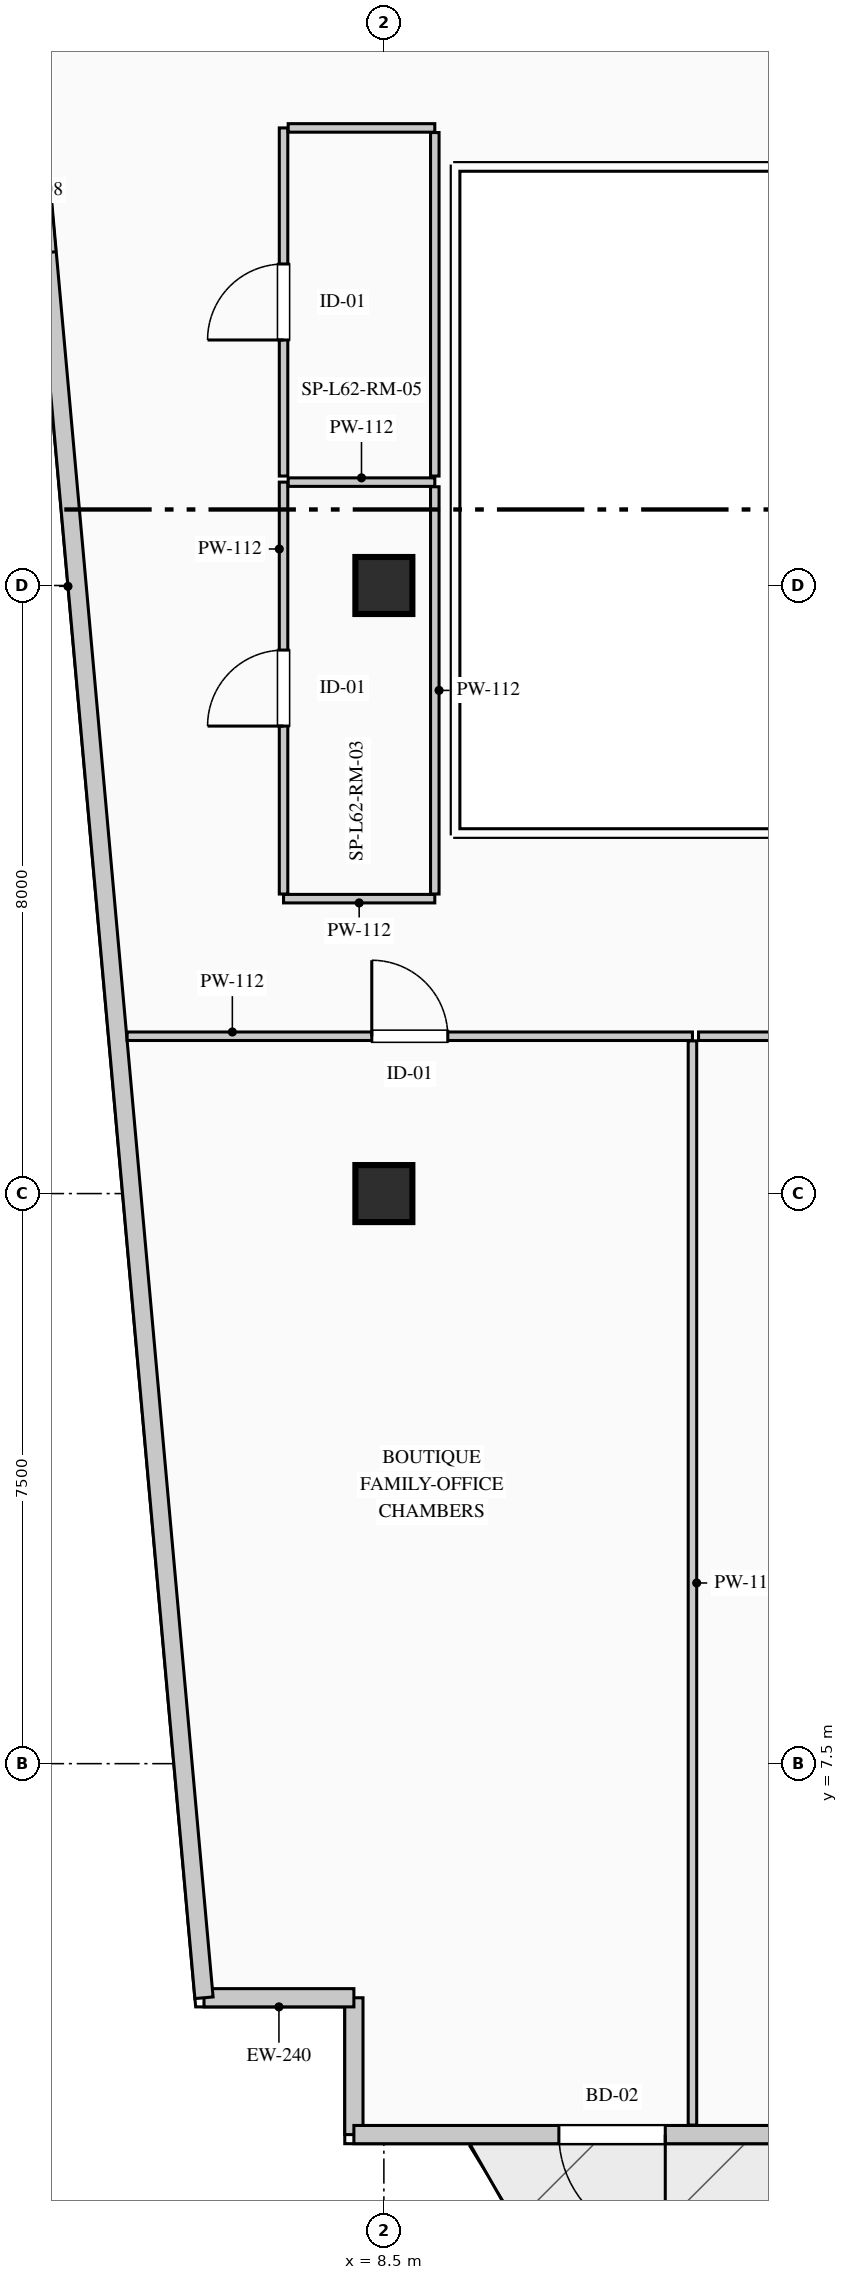
"""IFC4 building model, lengths in metres.
Left out: names, types, materials, properties, quantities, classifications, styles, units other than length and angle.
Written with IfcOpenShell. Run it as: python <this file> out.ifc"""

import sys

from ifc_helpers import new_model, si_unit, direction, frame, frame_2d, origin, origin_2d, place, context, subcontext, project, spatial, rectangle, extrude, element, fill, save


model = new_model("IFC4")
c1 = context("Model", 3, precision=1e-05, world=origin(), true_north=direction((0.0, 1.0)))
c2 = subcontext(c1, "Body", "Model", "MODEL_VIEW")
j1 = project(units=[si_unit("LENGTHUNIT", "METRE"), si_unit("PLANEANGLEUNIT", "RADIAN")], contexts=[c1])
p1 = place(None, origin())
s1 = spatial("IfcSite", under=j1, at=p1, CompositionType="ELEMENT")
p2 = place(p1, origin())
s2 = spatial("IfcBuilding", under=s1, at=p2, CompositionType="ELEMENT")
p3 = place(p2, frame((0.0, 0.0, 260.65)))
s3 = spatial("IfcBuildingStorey", under=s2, at=p3, CompositionType="ELEMENT", Elevation=260.65)
for number, where, z_axis, x_axis in (
    (1, (8.5, 15.0, 0.0), (0.0, 0.0, 1.0), (1.0, 0.0, 0.0)),
    (2, (8.5, 23.0, 0.0), (0.0, 0.0, 1.0), (1.0, 0.0, 0.0)),
):
    element("IfcColumn", number, at=place(p3, frame(where, z_axis=z_axis, x_axis=x_axis)), inside=s3, PredefinedType="COLUMN", context=c2, shape_type="SweptSolid", body=[
        extrude(rectangle(XDim=0.75, YDim=0.75, at=origin_2d()), origin(), (0.0, 0.0, 1.0), 3.95),
    ])
p4 = place(p3, frame((8.105, 2.62, 0.0), z_axis=(0.0, 0.0, 1.0), x_axis=(0.0, 1.0, 0.0)))
e3 = element("IfcWall", 3, at=p4, inside=s3, PredefinedType="STANDARD", context=c2, shape_type="SweptSolid", body=[
    extrude(rectangle(XDim=1.8, YDim=0.24, at=frame_2d((0.9, 0.0))), origin(), (0.0, 0.0, 1.0), 3.7),
])
p5 = place(p3, frame((8.105, 4.42, 0.0), z_axis=(0.0, 0.0, 1.0), x_axis=(-1.0, 0.0, 0.0)))
e4 = element("IfcWall", 4, at=p5, inside=s3, PredefinedType="STANDARD", context=c2, shape_type="SweptSolid", body=[
    extrude(rectangle(XDim=1.972, YDim=0.24, at=frame_2d((0.986, 0.0))), origin(), (0.0, 0.0, 1.0), 3.7),
])
p6 = place(p3, frame((6.133, 4.42, 0.0), z_axis=(0.0, 0.0, 1.0), x_axis=(-0.089522678378, 0.995984784048, 0.0)))
e5 = element("IfcWall", 5, at=p6, inside=s3, PredefinedType="STANDARD", context=c2, shape_type="SweptSolid", body=[
    extrude(rectangle(XDim=37.31, YDim=0.24, at=frame_2d((18.655, 0.0))), origin(), (0.0, 0.0, 1.0), 3.7),
])
p7 = place(p6, frame((23.053, 0.0, 0.9)))
e6 = element("IfcOpeningElement", 6, at=p7, cuts=e5, PredefinedType="OPENING", context=c2, shape_type="SweptSolid", body=[
    extrude(rectangle(XDim=1.65, YDim=1.95, at=frame_2d((0.825, 0.975))), frame((0.0, 0.13, 0.0), z_axis=(0.0, -1.0, 0.0), x_axis=(1.0, 0.0, 0.0)), (0.0, 0.0, 1.0), 0.26),
])
p8 = place(p3, frame((16.513, 2.62, 0.0), z_axis=(0.0, 0.0, 1.0), x_axis=(-1.0, 0.0, 0.0)))
e7 = element("IfcWall", 7, at=p8, inside=s3, PredefinedType="STANDARD", context=c2, shape_type="SweptSolid", body=[
    extrude(rectangle(XDim=8.408, YDim=0.24, at=frame_2d((4.204, 0.0))), origin(), (0.0, 0.0, 1.0), 3.7),
])
p9 = place(p8, frame((4.311, 0.0, 0.0)))
e8 = element("IfcOpeningElement", 8, at=p9, cuts=e7, PredefinedType="OPENING", context=c2, shape_type="SweptSolid", body=[
    extrude(rectangle(XDim=1.4, YDim=2.2, at=frame_2d((0.7, 1.1))), frame((0.0, 0.13, 0.0), z_axis=(0.0, -1.0, 0.0), x_axis=(1.0, 0.0, 0.0)), (0.0, 0.0, 1.0), 0.26),
])
p10 = place(p3, frame((5.122, 17.07, 0.0), z_axis=(0.0, 0.0, 1.0), x_axis=(1.0, 0.0, 0.0)))
e9 = element("IfcWall", 9, at=p10, inside=s3, PredefinedType="PARTITIONING", context=c2, shape_type="SweptSolid", body=[
    extrude(rectangle(XDim=7.438, YDim=0.112, at=frame_2d((3.719, 0.0))), origin(), (0.0, 0.0, 1.0), 3.7),
])
p11 = place(p10, frame((3.219, 0.0, 0.0)))
e10 = element("IfcOpeningElement", 10, at=p11, cuts=e9, PredefinedType="OPENING", context=c2, shape_type="SweptSolid", body=[
    extrude(rectangle(XDim=1.0, YDim=2.15, at=frame_2d((0.5, 1.075))), frame((0.0, 0.066, 0.0), z_axis=(0.0, -1.0, 0.0), x_axis=(1.0, 0.0, 0.0)), (0.0, 0.0, 1.0), 0.132),
])
p12 = place(p3, frame((12.56, 17.009, 0.0), z_axis=(0.0, 0.0, 1.0), x_axis=(0.0, -1.0, 0.0)))
e11 = element("IfcWall", 11, at=p12, inside=s3, PredefinedType="PARTITIONING", context=c2, shape_type="SweptSolid", body=[
    extrude(rectangle(XDim=14.264, YDim=0.112, at=frame_2d((7.132, 0.0))), origin(), (0.0, 0.0, 1.0), 3.7),
])
p13 = place(p3, frame((12.64, 17.07, 0.0), z_axis=(0.0, 0.0, 1.0), x_axis=(1.0, 0.0, 0.0)))
e12 = element("IfcWall", 12, at=p13, inside=s3, PredefinedType="PARTITIONING", context=c2, shape_type="SweptSolid", body=[
    extrude(rectangle(XDim=7.587, YDim=0.112, at=frame_2d((3.793, 0.0))), origin(), (0.0, 0.0, 1.0), 3.7),
])
p14 = place(p13, frame((3.293, 0.0, 0.0)))
e13 = element("IfcOpeningElement", 13, at=p14, cuts=e12, PredefinedType="OPENING", context=c2, shape_type="SweptSolid", body=[
    extrude(rectangle(XDim=1.0, YDim=2.15, at=frame_2d((0.5, 1.075))), frame((0.0, 0.066, 0.0), z_axis=(0.0, -1.0, 0.0), x_axis=(1.0, 0.0, 0.0)), (0.0, 0.0, 1.0), 0.132),
])
p15 = place(p3, frame((9.17, 18.88, 0.0), z_axis=(0.0, 0.0, 1.0), x_axis=(-1.0, 0.0, 0.0)))
e14 = element("IfcWall", 14, at=p15, inside=s3, PredefinedType="PARTITIONING", context=c2, shape_type="SweptSolid", body=[
    extrude(rectangle(XDim=1.99, YDim=0.112, at=frame_2d((0.995, 0.0))), origin(), (0.0, 0.0, 1.0), 3.7),
])
p16 = place(p3, frame((7.18, 18.941, 0.0), z_axis=(0.0, 0.0, 1.0), x_axis=(0.0, 1.0, 0.0)))
e15 = element("IfcWall", 15, at=p16, inside=s3, PredefinedType="PARTITIONING", context=c2, shape_type="SweptSolid", body=[
    extrude(rectangle(XDim=5.419, YDim=0.112, at=frame_2d((2.709, 0.0))), origin(), (0.0, 0.0, 1.0), 3.7),
])
p17 = place(p16, frame((2.209, 0.0, 0.0)))
e16 = element("IfcOpeningElement", 16, at=p17, cuts=e15, PredefinedType="OPENING", context=c2, shape_type="SweptSolid", body=[
    extrude(rectangle(XDim=1.0, YDim=2.15, at=frame_2d((0.5, 1.075))), frame((0.0, 0.066, 0.0), z_axis=(0.0, -1.0, 0.0), x_axis=(1.0, 0.0, 0.0)), (0.0, 0.0, 1.0), 0.132),
])
p18 = place(p3, frame((7.241, 24.36, 0.0), z_axis=(0.0, 0.0, 1.0), x_axis=(1.0, 0.0, 0.0)))
e17 = element("IfcWall", 17, at=p18, inside=s3, PredefinedType="PARTITIONING", context=c2, shape_type="SweptSolid", body=[
    extrude(rectangle(XDim=1.929, YDim=0.112, at=frame_2d((0.964, 0.0))), origin(), (0.0, 0.0, 1.0), 3.7),
])
p19 = place(p3, frame((9.17, 24.299, 0.0), z_axis=(0.0, 0.0, 1.0), x_axis=(0.0, -1.0, 0.0)))
e18 = element("IfcWall", 18, at=p19, inside=s3, PredefinedType="PARTITIONING", context=c2, shape_type="SweptSolid", body=[
    extrude(rectangle(XDim=5.358, YDim=0.112, at=frame_2d((2.679, 0.0))), origin(), (0.0, 0.0, 1.0), 3.385),
])
p20 = place(p3, frame((7.18, 24.44, 0.0), z_axis=(0.0, 0.0, 1.0), x_axis=(0.0, 1.0, 0.0)))
e19 = element("IfcWall", 19, at=p20, inside=s3, PredefinedType="PARTITIONING", context=c2, shape_type="SweptSolid", body=[
    extrude(rectangle(XDim=4.58, YDim=0.112, at=frame_2d((2.29, 0.0))), origin(), (0.0, 0.0, 1.0), 3.7),
])
p21 = place(p20, frame((1.79, 0.0, 0.0)))
e20 = element("IfcOpeningElement", 20, at=p21, cuts=e19, PredefinedType="OPENING", context=c2, shape_type="SweptSolid", body=[
    extrude(rectangle(XDim=1.0, YDim=2.15, at=frame_2d((0.5, 1.075))), frame((0.0, 0.066, 0.0), z_axis=(0.0, -1.0, 0.0), x_axis=(1.0, 0.0, 0.0)), (0.0, 0.0, 1.0), 0.132),
])
p22 = place(p3, frame((7.241, 29.02, 0.0), z_axis=(0.0, 0.0, 1.0), x_axis=(1.0, 0.0, 0.0)))
e21 = element("IfcWall", 21, at=p22, inside=s3, PredefinedType="PARTITIONING", context=c2, shape_type="SweptSolid", body=[
    extrude(rectangle(XDim=1.929, YDim=0.112, at=frame_2d((0.964, 0.0))), origin(), (0.0, 0.0, 1.0), 3.7),
])
p23 = place(p3, frame((9.17, 28.959, 0.0), z_axis=(0.0, 0.0, 1.0), x_axis=(0.0, -1.0, 0.0)))
e22 = element("IfcWall", 22, at=p23, inside=s3, PredefinedType="PARTITIONING", context=c2, shape_type="SweptSolid", body=[
    extrude(rectangle(XDim=4.519, YDim=0.112, at=frame_2d((2.26, 0.0))), origin(), (0.0, 0.0, 1.0), 3.385),
])
p24 = place(p9, origin())
e23 = element("IfcDoor", 23, at=p24, inside=s3, OperationType="SINGLE_SWING_LEFT", PredefinedType="DOOR", context=c2, shape_type="SweptSolid", body=[
    extrude(rectangle(XDim=1.4, YDim=2.2, at=frame_2d((0.7, 1.1))), frame((0.0, 0.025, 0.0), z_axis=(0.0, -1.0, 0.0), x_axis=(1.0, 0.0, 0.0)), (0.0, 0.0, 1.0), 0.05),
])
fill(e8, e23)
p25 = place(p11, origin())
e24 = element("IfcDoor", 24, at=p25, inside=s3, OperationType="SINGLE_SWING_LEFT", PredefinedType="DOOR", context=c2, shape_type="SweptSolid", body=[
    extrude(rectangle(XDim=1.0, YDim=2.15, at=frame_2d((0.5, 1.075))), frame((0.0, 0.025, 0.0), z_axis=(0.0, -1.0, 0.0), x_axis=(1.0, 0.0, 0.0)), (0.0, 0.0, 1.0), 0.05),
])
fill(e10, e24)
p26 = place(p17, origin())
e25 = element("IfcDoor", 25, at=p26, inside=s3, OperationType="SINGLE_SWING_LEFT", PredefinedType="DOOR", context=c2, shape_type="SweptSolid", body=[
    extrude(rectangle(XDim=1.0, YDim=2.15, at=frame_2d((0.5, 1.075))), frame((0.0, 0.025, 0.0), z_axis=(0.0, -1.0, 0.0), x_axis=(1.0, 0.0, 0.0)), (0.0, 0.0, 1.0), 0.05),
])
fill(e16, e25)
p27 = place(p21, origin())
e26 = element("IfcDoor", 26, at=p27, inside=s3, OperationType="SINGLE_SWING_LEFT", PredefinedType="DOOR", context=c2, shape_type="SweptSolid", body=[
    extrude(rectangle(XDim=1.0, YDim=2.15, at=frame_2d((0.5, 1.075))), frame((0.0, 0.025, 0.0), z_axis=(0.0, -1.0, 0.0), x_axis=(1.0, 0.0, 0.0)), (0.0, 0.0, 1.0), 0.05),
])
fill(e20, e26)
save(model, sys.argv[1])
